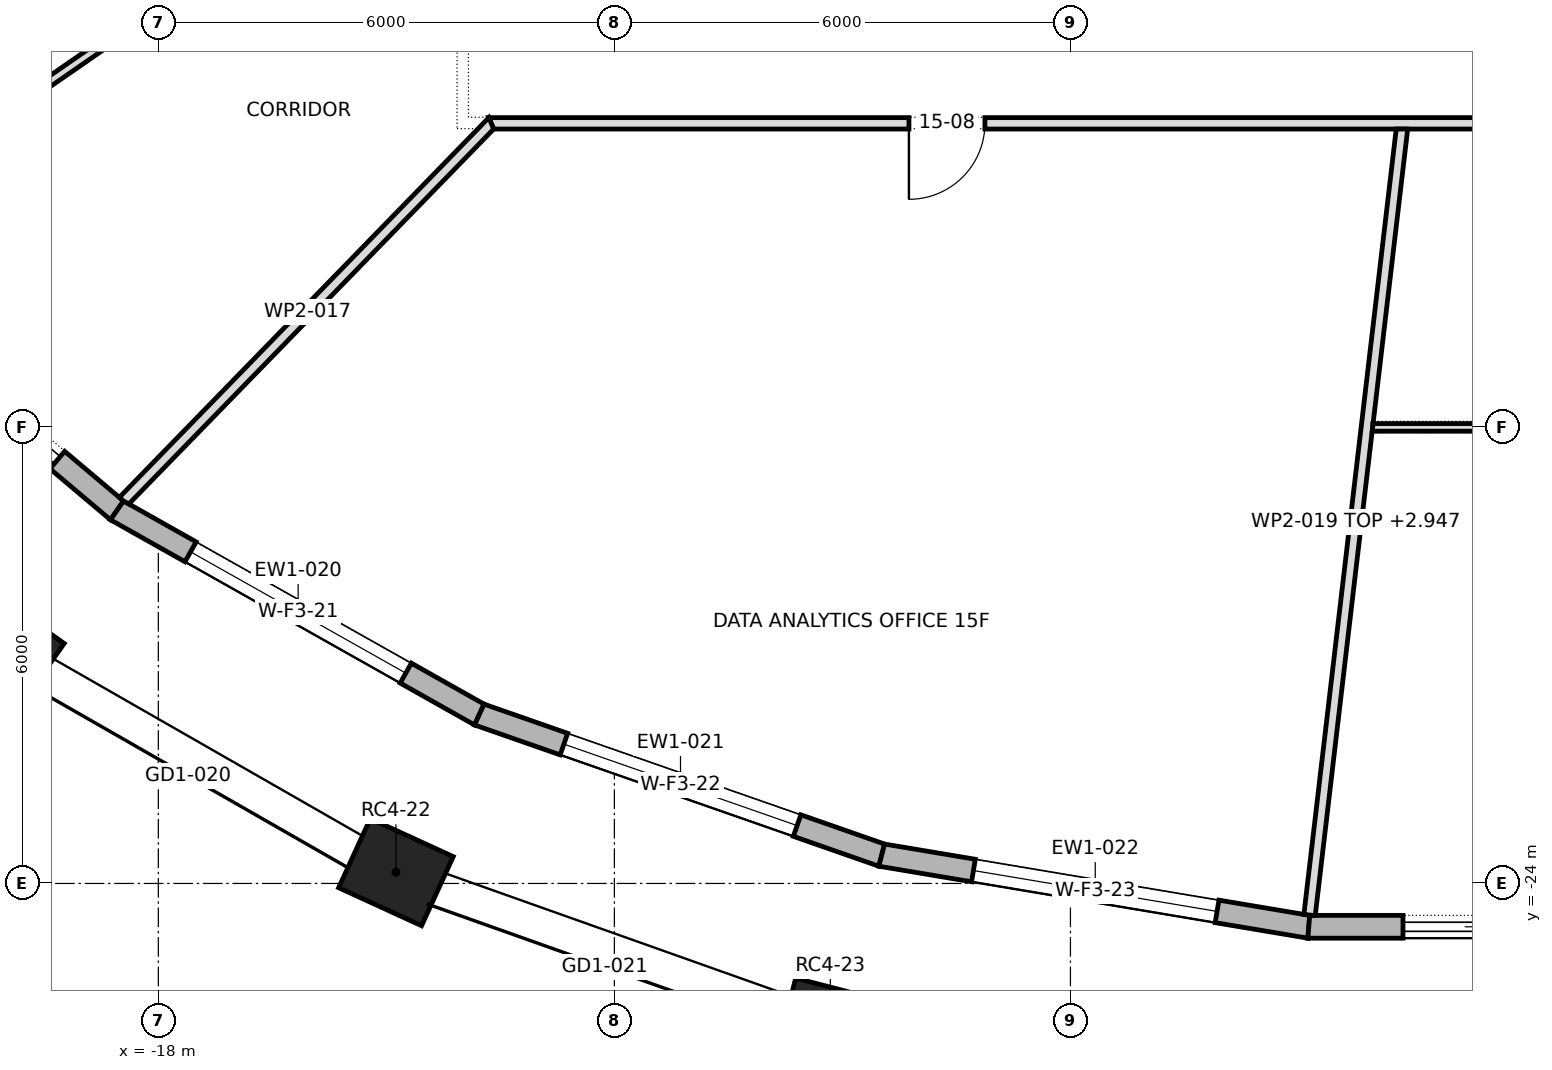
"""IFC4 building model, lengths in metres.
Left out: names, types, materials, properties, quantities, classifications, styles, units other than length and angle.
Written with IfcOpenShell. Run it as: python <this file> out.ifc"""

import sys

from ifc_helpers import new_model, si_unit, direction, frame, frame_2d, origin, origin_2d, place, context, subcontext, project, spatial, polyline, rectangle, outline, extrude, element, fill, save


model = new_model("IFC4")
c1 = context("Model", 3, precision=1e-05, world=origin(), true_north=direction((0.0, 1.0)))
c2 = subcontext(c1, "Body", "Model", "MODEL_VIEW")
j1 = project(units=[si_unit("LENGTHUNIT", "METRE"), si_unit("PLANEANGLEUNIT", "RADIAN")], contexts=[c1])
p1 = place(None, origin())
s1 = spatial("IfcSite", under=j1, at=p1, CompositionType="ELEMENT")
p2 = place(p1, origin())
s2 = spatial("IfcBuilding", under=s1, at=p2, CompositionType="ELEMENT")
p3 = place(p2, frame((0.0, 0.0, 222.9)))
s3 = spatial("IfcBuildingStorey", under=s2, at=p3, CompositionType="ELEMENT", Elevation=222.9)
for number, where, z_axis, x_axis in (
    (1, (-20.017, -20.906, 0.0), (0.0, 0.0, 1.0), (0.818, -0.575, 0.0)),
    (2, (-14.874, -23.852, 0.0), (0.0, 0.0, 1.0), (0.909, -0.417, 0.0)),
    (3, (-9.159, -25.881, 0.0), (0.0, 0.0, 1.0), (0.968, -0.252, 0.0)),
):
    element("IfcColumn", number, at=place(p3, frame(where, z_axis=z_axis, x_axis=x_axis)), inside=s3, PredefinedType="COLUMN", context=c2, shape_type="SweptSolid", body=[
        extrude(rectangle(XDim=1.2, YDim=1.0, at=origin_2d()), origin(), (0.0, 0.0, 1.0), 4.0),
    ])
p4 = place(p3, frame((-22.599, -15.672, 0.0), z_axis=(0.0, 0.0, 1.0), x_axis=(0.764397795062, -0.644744919255, 0.0)))
e4 = element("IfcWall", 4, at=p4, inside=s3, PredefinedType="STANDARD", context=c2, shape_type="SweptSolid", body=[
    extrude(outline(polyline([(-0.015, -0.15), (5.319, -0.15), (5.291, 0.15), (0.015, 0.15), (-0.015, -0.15)])), origin(), (0.0, 0.0, 1.0), 3.7),
])
p5 = place(p4, frame((1.028, 0.0, 0.0)))
e5 = element("IfcOpeningElement", 5, at=p5, cuts=e4, PredefinedType="OPENING", context=c2, shape_type="SweptSolid", body=[
    extrude(rectangle(XDim=3.25, YDim=3.25, at=frame_2d((1.625, 1.625))), frame((0.0, 0.162, 0.0), z_axis=(0.0, -1.0, 0.0), x_axis=(1.0, 0.0, 0.0)), (0.0, 0.0, 1.0), 0.324),
])
p6 = place(p3, frame((-18.543, -19.092, 0.0), z_axis=(0.0, 0.0, 1.0), x_axis=(0.871207038577, -0.490915772749, 0.0)))
e6 = element("IfcWall", 6, at=p6, inside=s3, PredefinedType="STANDARD", context=c2, shape_type="SweptSolid", body=[
    extrude(outline(polyline([(-0.014, -0.15), (5.484, -0.15), (5.458, 0.15), (0.014, 0.15), (-0.014, -0.15)])), origin(), (0.0, 0.0, 1.0), 3.7),
])
p7 = place(p6, frame((1.111, 0.0, 0.6)))
e7 = element("IfcOpeningElement", 7, at=p7, cuts=e6, PredefinedType="OPENING", context=c2, shape_type="SweptSolid", body=[
    extrude(rectangle(XDim=3.25, YDim=2.65, at=frame_2d((1.625, 1.325))), frame((0.0, 0.162, 0.0), z_axis=(0.0, -1.0, 0.0), x_axis=(1.0, 0.0, 0.0)), (0.0, 0.0, 1.0), 0.324),
])
p8 = place(p3, frame((-13.777, -21.778, 0.0), z_axis=(0.0, 0.0, 1.0), x_axis=(0.944053670735, -0.329791853708, 0.0)))
e8 = element("IfcWall", 8, at=p8, inside=s3, PredefinedType="STANDARD", context=c2, shape_type="SweptSolid", body=[
    extrude(outline(polyline([(-0.013, -0.15), (5.62, -0.15), (5.595, 0.15), (0.013, 0.15), (-0.013, -0.15)])), origin(), (0.0, 0.0, 1.0), 3.7),
])
p9 = place(p8, frame((1.179, 0.0, 0.6)))
e9 = element("IfcOpeningElement", 9, at=p9, cuts=e8, PredefinedType="OPENING", context=c2, shape_type="SweptSolid", body=[
    extrude(rectangle(XDim=3.25, YDim=2.65, at=frame_2d((1.625, 1.325))), frame((0.0, 0.162, 0.0), z_axis=(0.0, -1.0, 0.0), x_axis=(1.0, 0.0, 0.0)), (0.0, 0.0, 1.0), 0.324),
])
p10 = place(p3, frame((-8.483, -23.627, 0.0), z_axis=(0.0, 0.0, 1.0), x_axis=(0.986218486863, -0.16544816762, 0.0)))
e10 = element("IfcWall", 10, at=p10, inside=s3, PredefinedType="STANDARD", context=c2, shape_type="SweptSolid", body=[
    extrude(outline(polyline([(-0.013, -0.15), (5.71, -0.15), (5.685, 0.15), (0.013, 0.15), (-0.013, -0.15)])), origin(), (0.0, 0.0, 1.0), 3.7),
])
p11 = place(p10, frame((1.224, 0.0, 0.6)))
e11 = element("IfcOpeningElement", 11, at=p11, cuts=e10, PredefinedType="OPENING", context=c2, shape_type="SweptSolid", body=[
    extrude(rectangle(XDim=3.25, YDim=2.65, at=frame_2d((1.625, 1.325))), frame((0.0, 0.162, 0.0), z_axis=(0.0, -1.0, 0.0), x_axis=(1.0, 0.0, 0.0)), (0.0, 0.0, 1.0), 0.324),
])
p12 = place(p3, frame((-2.864, -24.57, 0.0), z_axis=(0.0, 0.0, 1.0), x_axis=(1.0, 0.0, 0.0)))
e12 = element("IfcWall", 12, at=p12, inside=s3, PredefinedType="STANDARD", context=c2, shape_type="SweptSolid", body=[
    extrude(outline(polyline([(-0.012, -0.15), (5.741, -0.15), (5.716, 0.15), (0.012, 0.15), (-0.012, -0.15)])), origin(), (0.0, 0.0, 1.0), 3.7),
])
p13 = place(p12, frame((1.239, 0.0, 0.0)))
e13 = element("IfcOpeningElement", 13, at=p13, cuts=e12, PredefinedType="OPENING", context=c2, shape_type="SweptSolid", body=[
    extrude(rectangle(XDim=3.25, YDim=3.25, at=frame_2d((1.625, 1.625))), frame((0.0, 0.162, 0.0), z_axis=(0.0, -1.0, 0.0), x_axis=(1.0, 0.0, 0.0)), (0.0, 0.0, 1.0), 0.324),
])
p14 = place(p3, frame((-22.493, -15.569, 0.0), z_axis=(0.0, 0.0, 1.0), x_axis=(0.822322462014, 0.569021764494, 0.0)))
e14 = element("IfcWall", 14, at=p14, inside=s3, PredefinedType="PARTITIONING", context=c2, shape_type="SweptSolid", body=[
    extrude(outline(polyline([(0.02, -0.06), (1.834, -0.06), (3.649, -0.06), (5.464, -0.06), (5.464, 0.06), (3.643, 0.06), (1.821, 0.06), (0.0, 0.06), (0.0, 0.053), (0.003, 0.0), (0.02, -0.06)])), origin(), (0.0, 0.0, 1.0), 3.7),
])
p15 = place(p3, frame((-13.652, -14.0, 0.0), z_axis=(0.0, 0.0, 1.0), x_axis=(1.0, 0.0, 0.0)))
e15 = element("IfcWall", 15, at=p15, inside=s3, PredefinedType="PARTITIONING", context=c2, shape_type="SweptSolid", body=[
    extrude(outline(polyline([(0.063, -0.075), (2.004, -0.075), (3.946, -0.075), (5.887, -0.075), (7.828, -0.075), (9.769, -0.075), (11.71, -0.075), (13.652, -0.075), (15.593, -0.075), (17.534, -0.075), (19.475, -0.075), (21.417, -0.075), (23.358, -0.075), (25.299, -0.075), (27.24, -0.075), (27.303, 0.075), (27.303, 0.075), (25.353, 0.075), (23.403, 0.075), (21.453, 0.075), (19.502, 0.075), (17.552, 0.075), (15.602, 0.075), (13.652, 0.075), (11.701, 0.075), (9.751, 0.075), (7.801, 0.075), (5.851, 0.075), (3.9, 0.075), (1.95, 0.075), (0.0, 0.075), (0.0, 0.075), (0.063, -0.075)])), origin(), (0.0, 0.0, 1.0), 3.7),
])
p16 = place(p15, frame((5.527, 0.0, 0.0)))
e16 = element("IfcOpeningElement", 16, at=p16, cuts=e15, PredefinedType="OPENING", context=c2, shape_type="SweptSolid", body=[
    extrude(rectangle(XDim=1.0, YDim=2.1, at=frame_2d((0.5, 1.05))), frame((0.0, 0.087, 0.0), z_axis=(0.0, -1.0, 0.0), x_axis=(1.0, 0.0, 0.0)), (0.0, 0.0, 1.0), 0.174),
])
p17 = place(p15, frame((14.857, 0.0, 0.0)))
e17 = element("IfcOpeningElement", 17, at=p17, cuts=e15, PredefinedType="OPENING", context=c2, shape_type="SweptSolid", body=[
    extrude(rectangle(XDim=1.0, YDim=2.1, at=frame_2d((0.5, 1.05))), frame((0.0, 0.087, 0.0), z_axis=(0.0, -1.0, 0.0), x_axis=(1.0, 0.0, 0.0)), (0.0, 0.0, 1.0), 0.174),
])
p18 = place(p15, frame((22.482, 0.0, 0.0)))
e18 = element("IfcOpeningElement", 18, at=p18, cuts=e15, PredefinedType="OPENING", context=c2, shape_type="SweptSolid", body=[
    extrude(rectangle(XDim=1.0, YDim=2.1, at=frame_2d((0.5, 1.05))), frame((0.0, 0.087, 0.0), z_axis=(0.0, -1.0, 0.0), x_axis=(1.0, 0.0, 0.0)), (0.0, 0.0, 1.0), 0.174),
])
p19 = place(p3, frame((-13.598, -13.977, 0.0), z_axis=(0.0, 0.0, 1.0), x_axis=(-0.697374409368, -0.716707006494, 0.0)))
e19 = element("IfcWall", 19, at=p19, inside=s3, PredefinedType="PARTITIONING", context=c2, shape_type="SweptSolid", body=[
    extrude(outline(polyline([(6.971, -0.075), (6.971, -0.07), (6.966, -0.002), (6.946, 0.075), (5.225, 0.075), (3.505, 0.075), (1.784, 0.075), (0.063, 0.075), (0.032, 0.0), (0.0, -0.075), (1.743, -0.075), (3.486, -0.075), (5.228, -0.075), (6.971, -0.075)])), origin(), (0.0, 0.0, 1.0), 3.7),
])
p20 = place(p3, frame((-2.854, -24.416, 0.0), z_axis=(0.0, 0.0, 1.0), x_axis=(0.116750167138, 0.993161315433, 0.0)))
e20 = element("IfcWall", 20, at=p20, inside=s3, PredefinedType="PARTITIONING", context=c2, shape_type="SweptSolid", body=[
    extrude(outline(polyline([(0.004, -0.075), (1.63, -0.075), (3.256, -0.075), (4.882, -0.075), (6.508, -0.075), (6.519, -0.074), (6.519, -0.075), (8.469, -0.075), (10.42, -0.075), (10.42, -0.072), (10.403, 0.075), (8.669, 0.075), (6.935, 0.075), (5.201, 0.075), (3.468, 0.075), (1.734, 0.075), (0.0, 0.075), (0.0, -0.039), (0.004, -0.075)])), origin(), (0.0, 0.0, 1.0), 2.947),
])
p21 = place(p3, frame((6.408, -18.0, 0.0), z_axis=(0.0, 0.0, 1.0), x_axis=(-1.0, 0.0, 0.0)))
e21 = element("IfcWall", 21, at=p21, inside=s3, PredefinedType="PARTITIONING", context=c2, shape_type="SweptSolid", body=[
    extrude(outline(polyline([(0.026, -0.05), (1.706, -0.05), (3.386, -0.05), (5.066, -0.05), (6.746, -0.05), (8.427, -0.05), (8.438, 0.047), (8.438, 0.05), (6.75, 0.05), (5.063, 0.05), (3.375, 0.05), (1.688, 0.05), (0.0, 0.05), (0.0, 0.049), (0.007, 0.03), (0.0, 0.028), (0.0, 0.021), (0.026, -0.05)])), origin(), (0.0, 0.0, 1.0), 3.7),
])
p22 = place(p21, frame((3.773, 0.0, 0.0)))
e22 = element("IfcOpeningElement", 22, at=p22, cuts=e21, PredefinedType="OPENING", context=c2, shape_type="SweptSolid", body=[
    extrude(rectangle(XDim=0.9, YDim=2.1, at=frame_2d((0.45, 1.05))), frame((0.0, 0.062, 0.0), z_axis=(0.0, -1.0, 0.0), x_axis=(1.0, 0.0, 0.0)), (0.0, 0.0, 1.0), 0.124),
])
p23 = place(p5, origin())
e23 = element("IfcDoor", 23, at=p23, inside=s3, OperationType="DOUBLE_DOOR_SLIDING", PredefinedType="DOOR", context=c2, shape_type="SweptSolid", body=[
    extrude(rectangle(XDim=3.25, YDim=3.25, at=frame_2d((1.625, 1.625))), frame((0.0, 0.025, 0.0), z_axis=(0.0, -1.0, 0.0), x_axis=(1.0, 0.0, 0.0)), (0.0, 0.0, 1.0), 0.05),
])
fill(e5, e23)
p24 = place(p7, origin())
e24 = element("IfcWindow", 24, at=p24, inside=s3, PartitioningType="TRIPLE_PANEL_VERTICAL", PredefinedType="WINDOW", context=c2, shape_type="SweptSolid", body=[
    extrude(rectangle(XDim=3.25, YDim=2.65, at=frame_2d((1.625, 1.325))), frame((0.0, 0.03, 0.0), z_axis=(0.0, -1.0, 0.0), x_axis=(1.0, 0.0, 0.0)), (0.0, 0.0, 1.0), 0.06),
])
fill(e7, e24)
p25 = place(p9, origin())
e25 = element("IfcWindow", 25, at=p25, inside=s3, PartitioningType="TRIPLE_PANEL_VERTICAL", PredefinedType="WINDOW", context=c2, shape_type="SweptSolid", body=[
    extrude(rectangle(XDim=3.25, YDim=2.65, at=frame_2d((1.625, 1.325))), frame((0.0, 0.03, 0.0), z_axis=(0.0, -1.0, 0.0), x_axis=(1.0, 0.0, 0.0)), (0.0, 0.0, 1.0), 0.06),
])
fill(e9, e25)
p26 = place(p11, origin())
e26 = element("IfcWindow", 26, at=p26, inside=s3, PartitioningType="TRIPLE_PANEL_VERTICAL", PredefinedType="WINDOW", context=c2, shape_type="SweptSolid", body=[
    extrude(rectangle(XDim=3.25, YDim=2.65, at=frame_2d((1.625, 1.325))), frame((0.0, 0.03, 0.0), z_axis=(0.0, -1.0, 0.0), x_axis=(1.0, 0.0, 0.0)), (0.0, 0.0, 1.0), 0.06),
])
fill(e11, e26)
p27 = place(p13, origin())
e27 = element("IfcDoor", 27, at=p27, inside=s3, OperationType="DOUBLE_DOOR_SLIDING", PredefinedType="DOOR", context=c2, shape_type="SweptSolid", body=[
    extrude(rectangle(XDim=3.25, YDim=3.25, at=frame_2d((1.625, 1.625))), frame((0.0, 0.025, 0.0), z_axis=(0.0, -1.0, 0.0), x_axis=(1.0, 0.0, 0.0)), (0.0, 0.0, 1.0), 0.05),
])
fill(e13, e27)
p28 = place(p16, frame((1.0, 0.0, 0.0), z_axis=(0.0, 0.0, 1.0), x_axis=(-1.0, 0.0, 0.0)))
e28 = element("IfcDoor", 28, at=p28, inside=s3, OperationType="SINGLE_SWING_LEFT", PredefinedType="DOOR", context=c2, shape_type="SweptSolid", body=[
    extrude(rectangle(XDim=1.0, YDim=2.1, at=frame_2d((0.5, 1.05))), frame((0.0, 0.025, 0.0), z_axis=(0.0, -1.0, 0.0), x_axis=(1.0, 0.0, 0.0)), (0.0, 0.0, 1.0), 0.05),
])
fill(e16, e28)
save(model, sys.argv[1])
